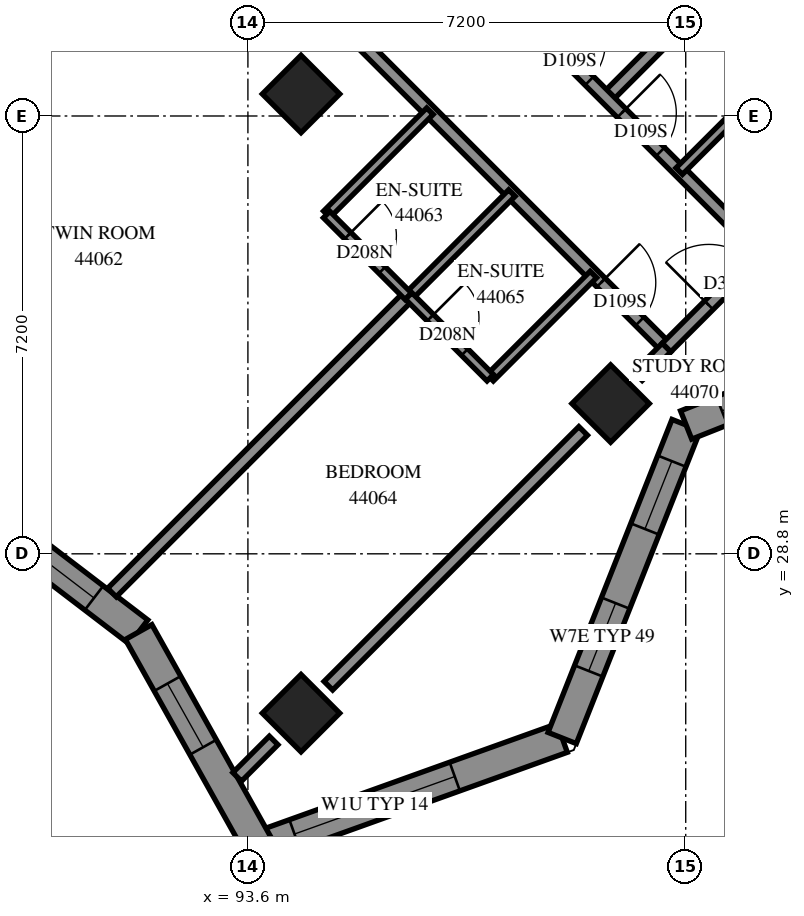
"""IFC4 building model, lengths in metres.
Left out: names, types, materials, properties, quantities, classifications, styles, units other than length and angle.
Written with IfcOpenShell. Run it as: python <this file> out.ifc"""

import sys

from ifc_helpers import new_model, si_unit, direction, frame, frame_2d, origin, origin_2d, place, context, subcontext, project, spatial, polyline, rectangle, outline, extrude, element, fill, save


model = new_model("IFC4")
c1 = context("Model", 3, precision=1e-05, world=origin(), true_north=direction((0.0, 1.0)))
c2 = subcontext(c1, "Body", "Model", "MODEL_VIEW")
j1 = project(units=[si_unit("LENGTHUNIT", "METRE"), si_unit("PLANEANGLEUNIT", "RADIAN")], contexts=[c1])
p1 = place(None, origin())
s1 = spatial("IfcSite", under=j1, at=p1, CompositionType="ELEMENT")
p2 = place(p1, origin())
s2 = spatial("IfcBuilding", under=s1, at=p2, CompositionType="ELEMENT")
p3 = place(p2, frame((0.0, 0.0, 162.6)))
s3 = spatial("IfcBuildingStorey", under=s2, at=p3, CompositionType="ELEMENT", Elevation=162.6)
for number, where, z_axis, x_axis in (
    (1, (94.474, 36.362, 0.0), (0.0, 0.0, 1.0), (0.707, -0.707, 0.0)),
    (2, (99.565, 31.271, 0.0), (0.0, 0.0, 1.0), (0.707, -0.707, 0.0)),
    (3, (94.474, 26.18, 0.0), (0.0, 0.0, 1.0), (0.707, -0.707, 0.0)),
):
    element("IfcColumn", number, at=place(p3, frame(where, z_axis=z_axis, x_axis=x_axis)), inside=s3, PredefinedType="COLUMN", context=c2, shape_type="SweptSolid", body=[
        extrude(rectangle(XDim=0.9, YDim=0.9, at=origin_2d()), origin(), (0.0, 0.0, 1.0), 3.1),
    ])
p4 = place(p3, frame((93.781, 23.982, 0.0), z_axis=(0.0, 0.0, 1.0), x_axis=(0.9412537462, 0.337700141, 0.0)))
e4 = element("IfcWall", 4, at=p4, inside=s3, PredefinedType="SOLIDWALL", context=c2, shape_type="SweptSolid", body=[
    extrude(outline(polyline([(-0.212, -0.25), (5.412, -0.25), (5.186, 0.25), (0.212, 0.25), (-0.212, -0.25)])), origin(), (0.0, 0.0, 1.0), 3.1),
])
p5 = place(p4, frame((0.622, 0.0, 0.45)))
e5 = element("IfcOpeningElement", 5, at=p5, cuts=e4, PredefinedType="OPENING", context=c2, shape_type="SweptSolid", body=[
    extrude(rectangle(XDim=2.8, YDim=2.5, at=frame_2d((1.4, 1.25))), frame((0.0, 0.26, 0.0), z_axis=(0.0, -1.0, 0.0), x_axis=(1.0, 0.0, 0.0)), (0.0, 0.0, 1.0), 0.52),
])
p6 = place(p3, frame((98.768, 25.771, 0.0), z_axis=(0.0, 0.0, 1.0), x_axis=(0.3682368161, 0.9297320298, 0.0)))
e6 = element("IfcWall", 6, at=p6, inside=s3, PredefinedType="SOLIDWALL", context=c2, shape_type="SweptSolid", body=[
    extrude(outline(polyline([(-0.113, -0.25), (5.428, -0.25), (5.644, 0.25), (0.113, 0.25), (-0.113, -0.25)])), origin(), (0.0, 0.0, 1.0), 3.1),
])
p7 = place(p6, frame((1.185, 0.0, 0.45)))
e7 = element("IfcOpeningElement", 7, at=p7, cuts=e6, PredefinedType="OPENING", context=c2, shape_type="SweptSolid", body=[
    extrude(rectangle(XDim=1.2, YDim=2.5, at=frame_2d((0.6, 1.25))), frame((0.0, 0.26, 0.0), z_axis=(0.0, -1.0, 0.0), x_axis=(1.0, 0.0, 0.0)), (0.0, 0.0, 1.0), 0.52),
])
p8 = place(p6, frame((3.697, 0.0, 0.45)))
e8 = element("IfcOpeningElement", 8, at=p8, cuts=e6, PredefinedType="OPENING", context=c2, shape_type="SweptSolid", body=[
    extrude(rectangle(XDim=1.2, YDim=2.5, at=frame_2d((0.6, 1.25))), frame((0.0, 0.26, 0.0), z_axis=(0.0, -1.0, 0.0), x_axis=(1.0, 0.0, 0.0)), (0.0, 0.0, 1.0), 0.52),
])
p9 = place(p3, frame((100.807, 30.918, 0.0), z_axis=(0.0, 0.0, 1.0), x_axis=(0.9297320298, 0.3682368161, 0.0)))
e9 = element("IfcWall", 9, at=p9, inside=s3, PredefinedType="SOLIDWALL", context=c2, shape_type="SweptSolid", body=[
    extrude(outline(polyline([(0.108, -0.25), (5.649, -0.25), (5.423, 0.25), (-0.108, 0.25), (0.108, -0.25)])), origin(), (0.0, 0.0, 1.0), 3.1),
])
p10 = place(p9, frame((0.632, 0.0, 0.45)))
e10 = element("IfcOpeningElement", 10, at=p10, cuts=e9, PredefinedType="OPENING", context=c2, shape_type="SweptSolid", body=[
    extrude(rectangle(XDim=2.8, YDim=2.5, at=frame_2d((1.4, 1.25))), frame((0.0, 0.26, 0.0), z_axis=(0.0, -1.0, 0.0), x_axis=(1.0, 0.0, 0.0)), (0.0, 0.0, 1.0), 0.52),
])
p11 = place(p3, frame((88.541, 30.005, 0.0), z_axis=(0.0, 0.0, 1.0), x_axis=(0.7946475008, -0.6070711239, 0.0)))
e11 = element("IfcWall", 11, at=p11, inside=s3, PredefinedType="SOLIDWALL", context=c2, shape_type="SweptSolid", body=[
    extrude(outline(polyline([(-0.034, -0.25), (4.053, -0.25), (4.156, 0.25), (0.034, 0.25), (-0.034, -0.25)])), origin(), (0.0, 0.0, 1.0), 3.1),
])
p12 = place(p11, frame((0.382, 0.0, 0.45)))
e12 = element("IfcOpeningElement", 12, at=p12, cuts=e11, PredefinedType="OPENING", context=c2, shape_type="SweptSolid", body=[
    extrude(rectangle(XDim=2.8, YDim=2.5, at=frame_2d((1.4, 1.25))), frame((0.0, 0.26, 0.0), z_axis=(0.0, -1.0, 0.0), x_axis=(1.0, 0.0, 0.0)), (0.0, 0.0, 1.0), 0.52),
])
p13 = place(p3, frame((91.802, 27.514, 0.0), z_axis=(0.0, 0.0, 1.0), x_axis=(0.4886665533, -0.8724706297, 0.0)))
e13 = element("IfcWall", 13, at=p13, inside=s3, PredefinedType="SOLIDWALL", context=c2, shape_type="SweptSolid", body=[
    extrude(outline(polyline([(0.052, -0.25), (4.26, -0.25), (3.837, 0.25), (-0.052, 0.25), (0.052, -0.25)])), origin(), (0.0, 0.0, 1.0), 3.1),
])
p14 = place(p13, frame((0.971, 0.0, 0.45)))
e14 = element("IfcOpeningElement", 14, at=p14, cuts=e13, PredefinedType="OPENING", context=c2, shape_type="SweptSolid", body=[
    extrude(rectangle(XDim=1.2, YDim=2.5, at=frame_2d((0.6, 1.25))), frame((0.0, 0.26, 0.0), z_axis=(0.0, -1.0, 0.0), x_axis=(1.0, 0.0, 0.0)), (0.0, 0.0, 1.0), 0.52),
])
p15 = place(p3, frame((92.209, 40.459, 0.0), z_axis=(0.0, 0.0, 1.0), x_axis=(0.7071067812, -0.7071067812, 0.0)))
e15 = element("IfcWall", 15, at=p15, inside=s3, PredefinedType="PARTITIONING", context=c2, shape_type="SweptSolid", body=[
    extrude(rectangle(XDim=11.698, YDim=0.2, at=frame_2d((5.849, 0.0))), origin(), (0.0, 0.0, 1.0), 3.1),
])
p16 = place(p15, frame((2.908, 0.0, 0.0)))
e16 = element("IfcOpeningElement", 16, at=p16, cuts=e15, PredefinedType="OPENING", context=c2, shape_type="SweptSolid", body=[
    extrude(rectangle(XDim=0.9, YDim=2.1, at=frame_2d((0.45, 1.05))), frame((0.0, 0.11, 0.0), z_axis=(0.0, -1.0, 0.0), x_axis=(1.0, 0.0, 0.0)), (0.0, 0.0, 1.0), 0.22),
])
p17 = place(p15, frame((10.181, 0.0, 0.0)))
e17 = element("IfcOpeningElement", 17, at=p17, cuts=e15, PredefinedType="OPENING", context=c2, shape_type="SweptSolid", body=[
    extrude(rectangle(XDim=0.9, YDim=2.1, at=frame_2d((0.45, 1.05))), frame((0.0, 0.11, 0.0), z_axis=(0.0, -1.0, 0.0), x_axis=(1.0, 0.0, 0.0)), (0.0, 0.0, 1.0), 0.22),
])
p18 = place(p3, frame((86.332, 33.309, 0.0), z_axis=(0.0, 0.0, 1.0), x_axis=(0.7072098544, 0.7070036929, 0.0)))
e18 = element("IfcWall", 18, at=p18, inside=s3, PredefinedType="PARTITIONING", context=c2, shape_type="SweptSolid", body=[
    extrude(rectangle(XDim=9.216, YDim=0.2, at=frame_2d((4.608, 0.0))), origin(), (0.0, 0.0, 1.0), 3.1),
])
p19 = place(p3, frame((86.837, 35.091, 0.0), z_axis=(0.0, 0.0, 1.0), x_axis=(0.7071067812, 0.7071067812, 0.0)))
e19 = element("IfcWall", 19, at=p19, inside=s3, PredefinedType="PARTITIONING", context=c2, shape_type="SweptSolid", body=[
    extrude(rectangle(XDim=7.597, YDim=0.2, at=frame_2d((3.799, 0.0))), origin(), (0.0, 0.0, 1.0), 3.1),
])
p20 = place(p19, frame((6.395, 0.0, 0.0)))
e20 = element("IfcOpeningElement", 20, at=p20, cuts=e19, PredefinedType="OPENING", context=c2, shape_type="SweptSolid", body=[
    extrude(rectangle(XDim=1.0, YDim=2.1, at=frame_2d((0.5, 1.05))), frame((0.0, 0.11, 0.0), z_axis=(0.0, -1.0, 0.0), x_axis=(1.0, 0.0, 0.0)), (0.0, 0.0, 1.0), 0.22),
])
p21 = place(p3, frame((91.364, 28.163, 0.0), z_axis=(0.0, 0.0, 1.0), x_axis=(0.7071067812, 0.7071067812, 0.0)))
e21 = element("IfcWall", 21, at=p21, inside=s3, PredefinedType="PARTITIONING", context=c2, shape_type="SweptSolid", body=[
    extrude(rectangle(XDim=6.896, YDim=0.2, at=frame_2d((3.448, 0.0))), origin(), (0.0, 0.0, 1.0), 3.1),
])
p22 = place(p3, frame((99.494, 36.292, 0.0), z_axis=(0.0, 0.0, 1.0), x_axis=(0.7071067812, 0.7071067812, 0.0)))
e22 = element("IfcWall", 22, at=p22, inside=s3, PredefinedType="PARTITIONING", context=c2, shape_type="SweptSolid", body=[
    extrude(rectangle(XDim=6.799, YDim=0.2, at=frame_2d((3.4, 0.0))), origin(), (0.0, 0.0, 1.0), 3.1),
])
p23 = place(p3, frame((94.923, 26.631, 0.0), z_axis=(0.0, 0.0, 1.0), x_axis=(0.7071067812, 0.7071067812, 0.0)))
e23 = element("IfcWall", 23, at=p23, inside=s3, PredefinedType="PARTITIONING", context=c2, shape_type="SweptSolid", body=[
    extrude(rectangle(XDim=5.926, YDim=0.2, at=frame_2d((2.963, 0.0))), origin(), (0.0, 0.0, 1.0), 2.6),
])
p24 = place(p3, frame((98.295, 37.497, 0.0), z_axis=(0.0, 0.0, 1.0), x_axis=(0.7071067812, -0.7071067812, 0.0)))
e24 = element("IfcWall", 24, at=p24, inside=s3, PredefinedType="PARTITIONING", context=c2, shape_type="SweptSolid", body=[
    extrude(rectangle(XDim=5.301, YDim=0.2, at=frame_2d((2.65, 0.0))), origin(), (0.0, 0.0, 1.0), 3.1),
])
p25 = place(p24, frame((0.401, 0.0, 0.0)))
e25 = element("IfcOpeningElement", 25, at=p25, cuts=e24, PredefinedType="OPENING", context=c2, shape_type="SweptSolid", body=[
    extrude(rectangle(XDim=0.9, YDim=2.1, at=frame_2d((0.45, 1.05))), frame((0.0, 0.11, 0.0), z_axis=(0.0, -1.0, 0.0), x_axis=(1.0, 0.0, 0.0)), (0.0, 0.0, 1.0), 0.22),
])
p26 = place(p24, frame((2.05, 0.0, 0.0)))
e26 = element("IfcOpeningElement", 26, at=p26, cuts=e24, PredefinedType="OPENING", context=c2, shape_type="SweptSolid", body=[
    extrude(rectangle(XDim=0.9, YDim=2.1, at=frame_2d((0.45, 1.05))), frame((0.0, 0.11, 0.0), z_axis=(0.0, -1.0, 0.0), x_axis=(1.0, 0.0, 0.0)), (0.0, 0.0, 1.0), 0.22),
])
p27 = place(p3, frame((97.583, 31.695, 0.0), z_axis=(0.0, 0.0, 1.0), x_axis=(0.7071067812, 0.7071067812, 0.0)))
e27 = element("IfcWall", 27, at=p27, inside=s3, PredefinedType="PARTITIONING", context=c2, shape_type="SweptSolid", body=[
    extrude(rectangle(XDim=2.401, YDim=0.15, at=frame_2d((1.201, 0.0))), origin(), (0.0, 0.0, 1.0), 3.1),
])
for number, where, z_axis, x_axis in (
    (28, (100.693, 35.093, 0.0), (0.0, 0.0, 1.0), (0.708, 0.707, 0.0)),
    (29, (96.245, 33.035, 0.0), (0.0, 0.0, 1.0), (0.707, 0.708, 0.0)),
):
    element("IfcWall", number, at=place(p3, frame(where, z_axis=z_axis, x_axis=x_axis)), inside=s3, PredefinedType="PARTITIONING", context=c2, shape_type="SweptSolid", body=[
        extrude(rectangle(XDim=2.4, YDim=0.15, at=frame_2d((1.2, 0.0))), origin(), (0.0, 0.0, 1.0), 3.1),
    ])
p28 = place(p3, frame((94.897, 34.383, 0.0), z_axis=(0.0, 0.0, 1.0), x_axis=(0.7071067812, 0.7071067812, 0.0)))
e30 = element("IfcWall", 30, at=p28, inside=s3, PredefinedType="PARTITIONING", context=c2, shape_type="SweptSolid", body=[
    extrude(rectangle(XDim=2.398, YDim=0.15, at=frame_2d((1.199, 0.0))), origin(), (0.0, 0.0, 1.0), 3.1),
])
p29 = place(p3, frame((100.483, 32.191, 0.0), z_axis=(0.0, 0.0, 1.0), x_axis=(0.7071067812, 0.7071067812, 0.0)))
e31 = element("IfcWall", 31, at=p29, inside=s3, PredefinedType="PARTITIONING", context=c2, shape_type="SweptSolid", body=[
    extrude(rectangle(XDim=2.2, YDim=0.2, at=frame_2d((1.1, 0.0))), origin(), (0.0, 0.0, 1.0), 2.6),
])
p30 = place(p29, frame((0.987, 0.0, 0.0)))
e32 = element("IfcOpeningElement", 32, at=p30, cuts=e31, PredefinedType="OPENING", context=c2, shape_type="SweptSolid", body=[
    extrude(rectangle(XDim=1.0, YDim=2.1, at=frame_2d((0.5, 1.05))), frame((0.0, 0.11, 0.0), z_axis=(0.0, -1.0, 0.0), x_axis=(1.0, 0.0, 0.0)), (0.0, 0.0, 1.0), 0.22),
])
p31 = place(p3, frame((94.895, 34.379, 0.0), z_axis=(0.0, 0.0, 1.0), x_axis=(0.7071067812, -0.7071067812, 0.0)))
e33 = element("IfcWall", 33, at=p31, inside=s3, PredefinedType="PARTITIONING", context=c2, shape_type="SweptSolid", body=[
    extrude(rectangle(XDim=1.901, YDim=0.15, at=frame_2d((0.95, 0.0))), origin(), (0.0, 0.0, 1.0), 3.1),
])
p32 = place(p31, frame((0.491, 0.0, 0.0)))
e34 = element("IfcOpeningElement", 34, at=p32, cuts=e33, PredefinedType="OPENING", context=c2, shape_type="SweptSolid", body=[
    extrude(rectangle(XDim=0.8, YDim=2.1, at=frame_2d((0.4, 1.05))), frame((0.0, 0.085, 0.0), z_axis=(0.0, -1.0, 0.0), x_axis=(1.0, 0.0, 0.0)), (0.0, 0.0, 1.0), 0.17),
])
p33 = place(p3, frame((96.243, 33.039, 0.0), z_axis=(0.0, 0.0, 1.0), x_axis=(0.7065800724, -0.7076330979, 0.0)))
e35 = element("IfcWall", 35, at=p33, inside=s3, PredefinedType="PARTITIONING", context=c2, shape_type="SweptSolid", body=[
    extrude(rectangle(XDim=1.899, YDim=0.15, at=frame_2d((0.95, 0.0))), origin(), (0.0, 0.0, 1.0), 3.1),
])
p34 = place(p33, frame((0.504, 0.0, 0.0)))
e36 = element("IfcOpeningElement", 36, at=p34, cuts=e35, PredefinedType="OPENING", context=c2, shape_type="SweptSolid", body=[
    extrude(rectangle(XDim=0.8, YDim=2.1, at=frame_2d((0.4, 1.05))), frame((0.0, 0.085, 0.0), z_axis=(0.0, -1.0, 0.0), x_axis=(1.0, 0.0, 0.0)), (0.0, 0.0, 1.0), 0.17),
])
p35 = place(p3, frame((93.424, 25.131, 0.0), z_axis=(0.0, 0.0, 1.0), x_axis=(0.7071067812, 0.7071067812, 0.0)))
e37 = element("IfcWall", 37, at=p35, inside=s3, PredefinedType="PARTITIONING", context=c2, shape_type="SweptSolid", body=[
    extrude(rectangle(XDim=0.848, YDim=0.2, at=frame_2d((0.424, 0.0))), origin(), (0.0, 0.0, 1.0), 3.1),
])
p36 = place(p3, frame((100.013, 31.721, 0.0), z_axis=(0.0, 0.0, 1.0), x_axis=(0.7071067812, 0.7071067812, 0.0)))
e38 = element("IfcWall", 38, at=p36, inside=s3, PredefinedType="PARTITIONING", context=c2, shape_type="SweptSolid", body=[
    extrude(rectangle(XDim=0.665, YDim=0.2, at=frame_2d((0.332, 0.0))), origin(), (0.0, 0.0, 1.0), 2.6),
])
p37 = place(p5, origin())
e39 = element("IfcWindow", 39, at=p37, inside=s3, PartitioningType="SINGLE_PANEL", PredefinedType="WINDOW", context=c2, shape_type="SweptSolid", body=[
    extrude(rectangle(XDim=2.8, YDim=2.5, at=frame_2d((1.4, 1.25))), frame((0.0, 0.18, 0.0), z_axis=(0.0, -1.0, 0.0), x_axis=(1.0, 0.0, 0.0)), (0.0, 0.0, 1.0), 0.06),
])
fill(e5, e39)
p38 = place(p7, origin())
e40 = element("IfcWindow", 40, at=p38, inside=s3, PartitioningType="SINGLE_PANEL", PredefinedType="WINDOW", context=c2, shape_type="SweptSolid", body=[
    extrude(rectangle(XDim=1.2, YDim=2.5, at=frame_2d((0.6, 1.25))), frame((0.0, 0.18, 0.0), z_axis=(0.0, -1.0, 0.0), x_axis=(1.0, 0.0, 0.0)), (0.0, 0.0, 1.0), 0.06),
])
fill(e7, e40)
p39 = place(p8, origin())
e41 = element("IfcWindow", 41, at=p39, inside=s3, PartitioningType="SINGLE_PANEL", PredefinedType="WINDOW", context=c2, shape_type="SweptSolid", body=[
    extrude(rectangle(XDim=1.2, YDim=2.5, at=frame_2d((0.6, 1.25))), frame((0.0, 0.18, 0.0), z_axis=(0.0, -1.0, 0.0), x_axis=(1.0, 0.0, 0.0)), (0.0, 0.0, 1.0), 0.06),
])
fill(e8, e41)
p40 = place(p10, origin())
e42 = element("IfcWindow", 42, at=p40, inside=s3, PartitioningType="SINGLE_PANEL", PredefinedType="WINDOW", context=c2, shape_type="SweptSolid", body=[
    extrude(rectangle(XDim=2.8, YDim=2.5, at=frame_2d((1.4, 1.25))), frame((0.0, 0.18, 0.0), z_axis=(0.0, -1.0, 0.0), x_axis=(1.0, 0.0, 0.0)), (0.0, 0.0, 1.0), 0.06),
])
fill(e10, e42)
p41 = place(p12, origin())
e43 = element("IfcWindow", 43, at=p41, inside=s3, PartitioningType="SINGLE_PANEL", PredefinedType="WINDOW", context=c2, shape_type="SweptSolid", body=[
    extrude(rectangle(XDim=2.8, YDim=2.5, at=frame_2d((1.4, 1.25))), frame((0.0, 0.18, 0.0), z_axis=(0.0, -1.0, 0.0), x_axis=(1.0, 0.0, 0.0)), (0.0, 0.0, 1.0), 0.06),
])
fill(e12, e43)
p42 = place(p14, origin())
e44 = element("IfcWindow", 44, at=p42, inside=s3, PartitioningType="SINGLE_PANEL", PredefinedType="WINDOW", context=c2, shape_type="SweptSolid", body=[
    extrude(rectangle(XDim=1.2, YDim=2.5, at=frame_2d((0.6, 1.25))), frame((0.0, 0.18, 0.0), z_axis=(0.0, -1.0, 0.0), x_axis=(1.0, 0.0, 0.0)), (0.0, 0.0, 1.0), 0.06),
])
fill(e14, e44)
p43 = place(p32, origin())
e45 = element("IfcDoor", 45, at=p43, inside=s3, OperationType="SINGLE_SWING_RIGHT", PredefinedType="DOOR", context=c2, shape_type="SweptSolid", body=[
    extrude(rectangle(XDim=0.8, YDim=2.1, at=frame_2d((0.4, 1.05))), frame((0.0, 0.025, 0.0), z_axis=(0.0, -1.0, 0.0), x_axis=(1.0, 0.0, 0.0)), (0.0, 0.0, 1.0), 0.05),
])
fill(e34, e45)
p44 = place(p17, origin())
e46 = element("IfcDoor", 46, at=p44, inside=s3, OperationType="SINGLE_SWING_LEFT", PredefinedType="DOOR", context=c2, shape_type="SweptSolid", body=[
    extrude(rectangle(XDim=0.9, YDim=2.1, at=frame_2d((0.45, 1.05))), frame((0.0, 0.025, 0.0), z_axis=(0.0, -1.0, 0.0), x_axis=(1.0, 0.0, 0.0)), (0.0, 0.0, 1.0), 0.05),
])
fill(e17, e46)
p45 = place(p34, origin())
e47 = element("IfcDoor", 47, at=p45, inside=s3, OperationType="SINGLE_SWING_RIGHT", PredefinedType="DOOR", context=c2, shape_type="SweptSolid", body=[
    extrude(rectangle(XDim=0.8, YDim=2.1, at=frame_2d((0.4, 1.05))), frame((0.0, 0.025, 0.0), z_axis=(0.0, -1.0, 0.0), x_axis=(1.0, 0.0, 0.0)), (0.0, 0.0, 1.0), 0.05),
])
fill(e36, e47)
p46 = place(p25, origin())
e48 = element("IfcDoor", 48, at=p46, inside=s3, OperationType="SINGLE_SWING_LEFT", PredefinedType="DOOR", context=c2, shape_type="SweptSolid", body=[
    extrude(rectangle(XDim=0.9, YDim=2.1, at=frame_2d((0.45, 1.05))), frame((0.0, 0.025, 0.0), z_axis=(0.0, -1.0, 0.0), x_axis=(1.0, 0.0, 0.0)), (0.0, 0.0, 1.0), 0.05),
])
fill(e25, e48)
p47 = place(p26, origin())
e49 = element("IfcDoor", 49, at=p47, inside=s3, OperationType="SINGLE_SWING_RIGHT", PredefinedType="DOOR", context=c2, shape_type="SweptSolid", body=[
    extrude(rectangle(XDim=0.9, YDim=2.1, at=frame_2d((0.45, 1.05))), frame((0.0, 0.025, 0.0), z_axis=(0.0, -1.0, 0.0), x_axis=(1.0, 0.0, 0.0)), (0.0, 0.0, 1.0), 0.05),
])
fill(e26, e49)
p48 = place(p30, origin())
e50 = element("IfcDoor", 50, at=p48, inside=s3, OperationType="SINGLE_SWING_RIGHT", PredefinedType="DOOR", context=c2, shape_type="SweptSolid", body=[
    extrude(rectangle(XDim=1.0, YDim=2.1, at=frame_2d((0.5, 1.05))), frame((0.0, 0.025, 0.0), z_axis=(0.0, -1.0, 0.0), x_axis=(1.0, 0.0, 0.0)), (0.0, 0.0, 1.0), 0.05),
])
fill(e32, e50)
save(model, sys.argv[1])
